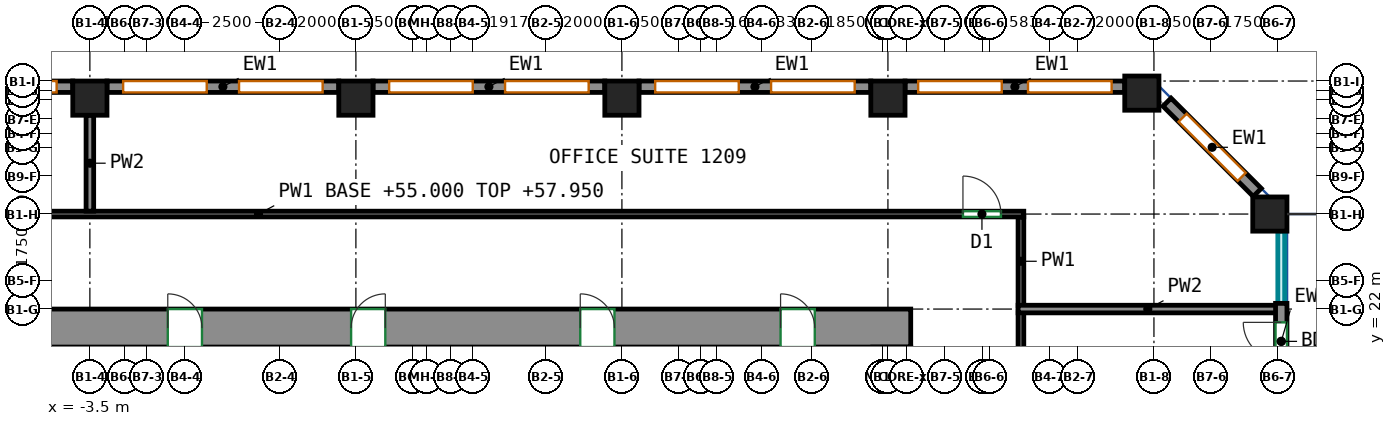
"""IFC4 building model, lengths in metres.
Left out: names, types, materials, properties, quantities, classifications, styles, units other than length and angle.
Written with IfcOpenShell. Run it as: python <this file> out.ifc"""

import sys

from ifc_helpers import new_model, si_unit, direction, frame, frame_2d, origin, origin_2d, place, context, subcontext, project, spatial, rectangle, extrude, source, transform, mapped, element, fill, save


model = new_model("IFC4")
c1 = context("Model", 3, precision=1e-05, world=origin(), true_north=direction((0.0, 1.0)))
c2 = subcontext(c1, "Body", "Model", "MODEL_VIEW")
j1 = project(units=[si_unit("LENGTHUNIT", "METRE"), si_unit("PLANEANGLEUNIT", "RADIAN")], contexts=[c1])
p1 = place(None, origin())
s1 = spatial("IfcSite", under=j1, at=p1, CompositionType="ELEMENT")
p2 = place(p1, origin())
s2 = spatial("IfcBuilding", under=s1, at=p2, CompositionType="ELEMENT")
p3 = place(p2, frame((0.0, 0.0, 55.0)))
s3 = spatial("IfcBuildingStorey", under=s2, at=p3, CompositionType="ELEMENT", Elevation=55.0)
m1 = source(origin(), c2, "Body", "SweptSolid", [
    extrude(rectangle(XDim=0.9, YDim=0.9, at=origin_2d()), origin(), (0.0, 0.0, 1.0), 3.6),
])
for number, where, z_axis, x_axis in (
    (1, (-3.5, 27.55, 0.0), (0.0, 0.0, 1.0), (1.0, 0.0, 0.0)),
    (2, (3.5, 27.55, 0.0), (0.0, 0.0, 1.0), (1.0, 0.0, 0.0)),
    (3, (10.5, 27.55, 0.0), (0.0, 0.0, 1.0), (1.0, 0.0, 0.0)),
    (4, (17.5, 27.55, 0.0), (0.0, 0.0, 1.0), (1.0, 0.0, 0.0)),
    (5, (24.182, 27.682, 0.0), (0.0, 0.0, 1.0), (1.0, 0.0, 0.0)),
    (6, (27.55, 24.5, 0.0), (0.0, 0.0, 1.0), (1.0, 0.0, 0.0)),
):
    element("IfcColumn", number, at=place(p3, frame(where, z_axis=z_axis, x_axis=x_axis)), inside=s3, PredefinedType="COLUMN", context=c2, shape_type="MappedRepresentation", body=[
        mapped(m1, transform((0.0, 0.0, 0.0))),
    ])
m2 = source(origin(), c2, "Body", "SweptSolid", [
    extrude(rectangle(XDim=34.1, YDim=1.0, at=frame_2d((17.05, 0.0))), origin(), (0.0, 0.0, 1.0), 3.6),
])
p4 = place(p3, frame((-16.0, 21.5, 0.0), z_axis=(0.0, 0.0, 1.0), x_axis=(1.0, 0.0, 0.0)))
e7 = element("IfcWall", 7, at=p4, inside=s3, PredefinedType="SHEAR", context=c2, shape_type="MappedRepresentation", body=[
    mapped(m2, transform((0.0, 0.0, 0.0))),
])
p5 = place(p4, frame((8.52, 0.0, 0.0)))
e8 = element("IfcOpeningElement", 8, at=p5, cuts=e7, PredefinedType="OPENING", context=c2, shape_type="SweptSolid", body=[
    extrude(rectangle(XDim=0.9, YDim=2.1, at=frame_2d((0.45, 1.05))), frame((0.0, 0.51, 0.0), z_axis=(0.0, -1.0, 0.0), x_axis=(1.0, 0.0, 0.0)), (0.0, 0.0, 1.0), 1.02),
])
p6 = place(p4, frame((14.55, 0.0, 0.0)))
e9 = element("IfcOpeningElement", 9, at=p6, cuts=e7, PredefinedType="OPENING", context=c2, shape_type="SweptSolid", body=[
    extrude(rectangle(XDim=0.9, YDim=2.1, at=frame_2d((0.45, 1.05))), frame((0.0, 0.51, 0.0), z_axis=(0.0, -1.0, 0.0), x_axis=(1.0, 0.0, 0.0)), (0.0, 0.0, 1.0), 1.02),
])
p7 = place(p4, frame((19.374, 0.0, 0.0)))
e10 = element("IfcOpeningElement", 10, at=p7, cuts=e7, PredefinedType="OPENING", context=c2, shape_type="SweptSolid", body=[
    extrude(rectangle(XDim=0.9, YDim=2.1, at=frame_2d((0.45, 1.05))), frame((0.0, 0.51, 0.0), z_axis=(0.0, -1.0, 0.0), x_axis=(1.0, 0.0, 0.0)), (0.0, 0.0, 1.0), 1.02),
])
p8 = place(p4, frame((25.404, 0.0, 0.0)))
e11 = element("IfcOpeningElement", 11, at=p8, cuts=e7, PredefinedType="OPENING", context=c2, shape_type="SweptSolid", body=[
    extrude(rectangle(XDim=0.9, YDim=2.1, at=frame_2d((0.45, 1.05))), frame((0.0, 0.51, 0.0), z_axis=(0.0, -1.0, 0.0), x_axis=(1.0, 0.0, 0.0)), (0.0, 0.0, 1.0), 1.02),
])
p9 = place(p4, frame((2.525, 0.0, 0.0)))
e12 = element("IfcOpeningElement", 12, at=p9, cuts=e7, PredefinedType="OPENING", context=c2, shape_type="SweptSolid", body=[
    extrude(rectangle(XDim=0.9, YDim=2.1, at=frame_2d((0.45, 1.05))), frame((0.0, 0.51, 0.0), z_axis=(0.0, -1.0, 0.0), x_axis=(1.0, 0.0, 0.0)), (0.0, 0.0, 1.0), 1.02),
])
p10 = place(p4, frame((30.675, 0.0, 0.0)))
e13 = element("IfcOpeningElement", 13, at=p10, cuts=e7, PredefinedType="OPENING", context=c2, shape_type="SweptSolid", body=[
    extrude(rectangle(XDim=0.9, YDim=2.1, at=frame_2d((0.45, 1.05))), frame((0.0, 0.51, 0.0), z_axis=(0.0, -1.0, 0.0), x_axis=(1.0, 0.0, 0.0)), (0.0, 0.0, 1.0), 1.02),
])
m3 = source(origin(), c2, "Body", "SweptSolid", [
    extrude(rectangle(XDim=2.0, YDim=0.3, at=frame_2d((1.0, 0.0))), origin(), (0.0, 0.0, 1.0), 3.6),
])
p11 = place(p3, frame((27.85, 20.15, 0.0), z_axis=(0.0, 0.0, 1.0), x_axis=(0.0, 1.0, 0.0)))
e14 = element("IfcWall", 14, at=p11, inside=s3, PredefinedType="SOLIDWALL", context=c2, shape_type="MappedRepresentation", body=[
    mapped(m3, transform((0.0, 0.0, 0.0))),
])
p12 = place(p11, frame((0.5, 0.0, 0.0)))
e15 = element("IfcOpeningElement", 15, at=p12, cuts=e14, PredefinedType="OPENING", context=c2, shape_type="SweptSolid", body=[
    extrude(rectangle(XDim=1.0, YDim=2.1, at=frame_2d((0.5, 1.05))), frame((0.0, 0.16, 0.0), z_axis=(0.0, -1.0, 0.0), x_axis=(1.0, 0.0, 0.0)), (0.0, 0.0, 1.0), 0.32),
])
m4 = source(origin(), c2, "Body", "SweptSolid", [
    extrude(rectangle(XDim=3.359, YDim=0.3, at=frame_2d((1.679, 0.0))), origin(), (0.0, 0.0, 1.0), 3.6),
])
p13 = place(p3, frame((27.219, 25.069, 0.0), z_axis=(0.0, 0.0, 1.0), x_axis=(-0.707070438228, 0.707143122278, 0.0)))
e16 = element("IfcWall", 16, at=p13, inside=s3, PredefinedType="SOLIDWALL", context=c2, shape_type="MappedRepresentation", body=[
    mapped(m4, transform((0.0, 0.0, 0.0))),
])
p14 = place(p13, frame((0.579, 0.0, 0.7)))
e17 = element("IfcOpeningElement", 17, at=p14, cuts=e16, PredefinedType="OPENING", context=c2, shape_type="SweptSolid", body=[
    extrude(rectangle(XDim=2.2, YDim=2.25, at=frame_2d((1.1, 1.125))), frame((0.0, 0.16, 0.0), z_axis=(0.0, -1.0, 0.0), x_axis=(1.0, 0.0, 0.0)), (0.0, 0.0, 1.0), 0.32),
])
m5 = source(origin(), c2, "Body", "SweptSolid", [
    extrude(rectangle(XDim=5.782, YDim=0.3, at=frame_2d((2.891, 0.0))), origin(), (0.0, 0.0, 1.0), 3.6),
])
p15 = place(p3, frame((23.732, 27.85, 0.0), z_axis=(0.0, 0.0, 1.0), x_axis=(-1.0, 0.0, 0.0)))
e18 = element("IfcWall", 18, at=p15, inside=s3, PredefinedType="SOLIDWALL", context=c2, shape_type="MappedRepresentation", body=[
    mapped(m5, transform((0.0, 0.0, 0.0))),
])
p16 = place(p15, frame((0.345, 0.0, 0.7)))
e19 = element("IfcOpeningElement", 19, at=p16, cuts=e18, PredefinedType="OPENING", context=c2, shape_type="SweptSolid", body=[
    extrude(rectangle(XDim=2.2, YDim=2.25, at=frame_2d((1.1, 1.125))), frame((0.0, 0.16, 0.0), z_axis=(0.0, -1.0, 0.0), x_axis=(1.0, 0.0, 0.0)), (0.0, 0.0, 1.0), 0.32),
])
p17 = place(p15, frame((3.236, 0.0, 0.7)))
e20 = element("IfcOpeningElement", 20, at=p17, cuts=e18, PredefinedType="OPENING", context=c2, shape_type="SweptSolid", body=[
    extrude(rectangle(XDim=2.2, YDim=2.25, at=frame_2d((1.1, 1.125))), frame((0.0, 0.16, 0.0), z_axis=(0.0, -1.0, 0.0), x_axis=(1.0, 0.0, 0.0)), (0.0, 0.0, 1.0), 0.32),
])
m6 = source(origin(), c2, "Body", "SweptSolid", [
    extrude(rectangle(XDim=6.1, YDim=0.3, at=frame_2d((3.05, 0.0))), origin(), (0.0, 0.0, 1.0), 3.6),
])
p18 = place(p3, frame((17.05, 27.85, 0.0), z_axis=(0.0, 0.0, 1.0), x_axis=(-1.0, 0.0, 0.0)))
e21 = element("IfcWall", 21, at=p18, inside=s3, PredefinedType="SOLIDWALL", context=c2, shape_type="MappedRepresentation", body=[
    mapped(m6, transform((0.0, 0.0, 0.0))),
])
p19 = place(p18, frame((0.425, 0.0, 0.7)))
e22 = element("IfcOpeningElement", 22, at=p19, cuts=e21, PredefinedType="OPENING", context=c2, shape_type="SweptSolid", body=[
    extrude(rectangle(XDim=2.2, YDim=2.25, at=frame_2d((1.1, 1.125))), frame((0.0, 0.16, 0.0), z_axis=(0.0, -1.0, 0.0), x_axis=(1.0, 0.0, 0.0)), (0.0, 0.0, 1.0), 0.32),
])
p20 = place(p18, frame((3.475, 0.0, 0.7)))
e23 = element("IfcOpeningElement", 23, at=p20, cuts=e21, PredefinedType="OPENING", context=c2, shape_type="SweptSolid", body=[
    extrude(rectangle(XDim=2.2, YDim=2.25, at=frame_2d((1.1, 1.125))), frame((0.0, 0.16, 0.0), z_axis=(0.0, -1.0, 0.0), x_axis=(1.0, 0.0, 0.0)), (0.0, 0.0, 1.0), 0.32),
])
p21 = place(p3, frame((10.05, 27.85, 0.0), z_axis=(0.0, 0.0, 1.0), x_axis=(-1.0, 0.0, 0.0)))
e24 = element("IfcWall", 24, at=p21, inside=s3, PredefinedType="SOLIDWALL", context=c2, shape_type="MappedRepresentation", body=[
    mapped(m6, transform((0.0, 0.0, 0.0))),
])
p22 = place(p21, frame((0.425, 0.0, 0.7)))
e25 = element("IfcOpeningElement", 25, at=p22, cuts=e24, PredefinedType="OPENING", context=c2, shape_type="SweptSolid", body=[
    extrude(rectangle(XDim=2.2, YDim=2.25, at=frame_2d((1.1, 1.125))), frame((0.0, 0.16, 0.0), z_axis=(0.0, -1.0, 0.0), x_axis=(1.0, 0.0, 0.0)), (0.0, 0.0, 1.0), 0.32),
])
p23 = place(p21, frame((3.475, 0.0, 0.7)))
e26 = element("IfcOpeningElement", 26, at=p23, cuts=e24, PredefinedType="OPENING", context=c2, shape_type="SweptSolid", body=[
    extrude(rectangle(XDim=2.2, YDim=2.25, at=frame_2d((1.1, 1.125))), frame((0.0, 0.16, 0.0), z_axis=(0.0, -1.0, 0.0), x_axis=(1.0, 0.0, 0.0)), (0.0, 0.0, 1.0), 0.32),
])
p24 = place(p3, frame((3.05, 27.85, 0.0), z_axis=(0.0, 0.0, 1.0), x_axis=(-1.0, 0.0, 0.0)))
e27 = element("IfcWall", 27, at=p24, inside=s3, PredefinedType="SOLIDWALL", context=c2, shape_type="MappedRepresentation", body=[
    mapped(m6, transform((0.0, 0.0, 0.0))),
])
p25 = place(p24, frame((0.425, 0.0, 0.7)))
e28 = element("IfcOpeningElement", 28, at=p25, cuts=e27, PredefinedType="OPENING", context=c2, shape_type="SweptSolid", body=[
    extrude(rectangle(XDim=2.2, YDim=2.25, at=frame_2d((1.1, 1.125))), frame((0.0, 0.16, 0.0), z_axis=(0.0, -1.0, 0.0), x_axis=(1.0, 0.0, 0.0)), (0.0, 0.0, 1.0), 0.32),
])
p26 = place(p24, frame((3.475, 0.0, 0.7)))
e29 = element("IfcOpeningElement", 29, at=p26, cuts=e27, PredefinedType="OPENING", context=c2, shape_type="SweptSolid", body=[
    extrude(rectangle(XDim=2.2, YDim=2.25, at=frame_2d((1.1, 1.125))), frame((0.0, 0.16, 0.0), z_axis=(0.0, -1.0, 0.0), x_axis=(1.0, 0.0, 0.0)), (0.0, 0.0, 1.0), 0.32),
])
p27 = place(p3, frame((-3.95, 27.85, 0.0), z_axis=(0.0, 0.0, 1.0), x_axis=(-1.0, 0.0, 0.0)))
e30 = element("IfcWall", 30, at=p27, inside=s3, PredefinedType="SOLIDWALL", context=c2, shape_type="MappedRepresentation", body=[
    mapped(m6, transform((0.0, 0.0, 0.0))),
])
p28 = place(p27, frame((0.425, 0.0, 0.7)))
e31 = element("IfcOpeningElement", 31, at=p28, cuts=e30, PredefinedType="OPENING", context=c2, shape_type="SweptSolid", body=[
    extrude(rectangle(XDim=2.2, YDim=2.25, at=frame_2d((1.1, 1.125))), frame((0.0, 0.16, 0.0), z_axis=(0.0, -1.0, 0.0), x_axis=(1.0, 0.0, 0.0)), (0.0, 0.0, 1.0), 0.32),
])
p29 = place(p27, frame((3.475, 0.0, 0.7)))
e32 = element("IfcOpeningElement", 32, at=p29, cuts=e30, PredefinedType="OPENING", context=c2, shape_type="SweptSolid", body=[
    extrude(rectangle(XDim=2.2, YDim=2.25, at=frame_2d((1.1, 1.125))), frame((0.0, 0.16, 0.0), z_axis=(0.0, -1.0, 0.0), x_axis=(1.0, 0.0, 0.0)), (0.0, 0.0, 1.0), 0.32),
])
p30 = place(p3, frame((21.0, 17.75, 0.0), z_axis=(0.0, 0.0, 1.0), x_axis=(0.0, 1.0, 0.0)))
e33 = element("IfcWall", 33, at=p30, inside=s3, PredefinedType="PARTITIONING", context=c2, shape_type="SweptSolid", body=[
    extrude(rectangle(XDim=4.16, YDim=0.15, at=frame_2d((2.08, 0.0))), origin(), (0.0, 0.0, 1.0), 3.6),
])
p31 = place(p3, frame((21.0, 22.09, 0.0), z_axis=(0.0, 0.0, 1.0), x_axis=(0.0, 1.0, 0.0)))
e34 = element("IfcWall", 34, at=p31, inside=s3, PredefinedType="PARTITIONING", context=c2, shape_type="SweptSolid", body=[
    extrude(rectangle(XDim=2.335, YDim=0.15, at=frame_2d((1.167, 0.0))), origin(), (0.0, 0.0, 1.0), 3.6),
])
p32 = place(p3, frame((-19.2, 24.5, 0.0), z_axis=(0.0, 0.0, 1.0), x_axis=(1.0, 0.0, 0.0)))
e35 = element("IfcWall", 35, at=p32, inside=s3, PredefinedType="PARTITIONING", context=c2, shape_type="SweptSolid", body=[
    extrude(rectangle(XDim=40.275, YDim=0.15, at=frame_2d((20.137, 0.0))), origin(), (0.0, 0.0, 1.0), 2.95),
])
p33 = place(p32, frame((3.007, 0.0, 0.0)))
e36 = element("IfcOpeningElement", 36, at=p33, cuts=e35, PredefinedType="OPENING", context=c2, shape_type="SweptSolid", body=[
    extrude(rectangle(XDim=0.9, YDim=2.1, at=frame_2d((0.45, 1.05))), frame((0.0, 0.085, 0.0), z_axis=(0.0, -1.0, 0.0), x_axis=(1.0, 0.0, 0.0)), (0.0, 0.0, 1.0), 0.17),
])
p34 = place(p32, frame((5.59, 0.0, 0.0)))
e37 = element("IfcOpeningElement", 37, at=p34, cuts=e35, PredefinedType="OPENING", context=c2, shape_type="SweptSolid", body=[
    extrude(rectangle(XDim=0.9, YDim=2.1, at=frame_2d((0.45, 1.05))), frame((0.0, 0.085, 0.0), z_axis=(0.0, -1.0, 0.0), x_axis=(1.0, 0.0, 0.0)), (0.0, 0.0, 1.0), 0.17),
])
p35 = place(p32, frame((38.674, 0.0, 0.0)))
e38 = element("IfcOpeningElement", 38, at=p35, cuts=e35, PredefinedType="OPENING", context=c2, shape_type="SweptSolid", body=[
    extrude(rectangle(XDim=1.0, YDim=2.1, at=frame_2d((0.5, 1.05))), frame((0.0, 0.085, 0.0), z_axis=(0.0, -1.0, 0.0), x_axis=(1.0, 0.0, 0.0)), (0.0, 0.0, 1.0), 0.17),
])
p36 = place(p3, frame((27.75, 22.0, 0.0), z_axis=(0.0, 0.0, 1.0), x_axis=(-1.0, 0.0, 0.0)))
e39 = element("IfcWall", 39, at=p36, inside=s3, PredefinedType="PARTITIONING", context=c2, shape_type="SweptSolid", body=[
    extrude(rectangle(XDim=6.824, YDim=0.2, at=frame_2d((3.412, 0.0))), origin(), (0.0, 0.0, 1.0), 3.6),
])
p37 = place(p3, frame((-3.5, 24.576, 0.0), z_axis=(0.0, 0.0, 1.0), x_axis=(0.0, 1.0, 0.0)))
e40 = element("IfcWall", 40, at=p37, inside=s3, PredefinedType="PARTITIONING", context=c2, shape_type="SweptSolid", body=[
    extrude(rectangle(XDim=2.524, YDim=0.2, at=frame_2d((1.262, 0.0))), origin(), (0.0, 0.0, 1.0), 3.6),
])
p38 = place(p12, origin())
e41 = element("IfcDoor", 41, at=p38, inside=s3, OperationType="SINGLE_SWING_RIGHT", PredefinedType="DOOR", context=c2, shape_type="SweptSolid", body=[
    extrude(rectangle(XDim=1.0, YDim=2.1, at=frame_2d((0.5, 1.05))), frame((0.0, 0.025, 0.0), z_axis=(0.0, -1.0, 0.0), x_axis=(1.0, 0.0, 0.0)), (0.0, 0.0, 1.0), 0.05),
])
fill(e15, e41)
p39 = place(p14, origin())
e42 = element("IfcWindow", 42, at=p39, inside=s3, PartitioningType="SINGLE_PANEL", PredefinedType="WINDOW", context=c2, shape_type="SweptSolid", body=[
    extrude(rectangle(XDim=2.2, YDim=2.25, at=frame_2d((1.1, 1.125))), frame((0.0, 0.03, 0.0), z_axis=(0.0, -1.0, 0.0), x_axis=(1.0, 0.0, 0.0)), (0.0, 0.0, 1.0), 0.06),
])
fill(e17, e42)
p40 = place(p16, origin())
e43 = element("IfcWindow", 43, at=p40, inside=s3, PartitioningType="SINGLE_PANEL", PredefinedType="WINDOW", context=c2, shape_type="SweptSolid", body=[
    extrude(rectangle(XDim=2.2, YDim=2.25, at=frame_2d((1.1, 1.125))), frame((0.0, 0.03, 0.0), z_axis=(0.0, -1.0, 0.0), x_axis=(1.0, 0.0, 0.0)), (0.0, 0.0, 1.0), 0.06),
])
fill(e19, e43)
p41 = place(p17, origin())
e44 = element("IfcWindow", 44, at=p41, inside=s3, PartitioningType="SINGLE_PANEL", PredefinedType="WINDOW", context=c2, shape_type="SweptSolid", body=[
    extrude(rectangle(XDim=2.2, YDim=2.25, at=frame_2d((1.1, 1.125))), frame((0.0, 0.03, 0.0), z_axis=(0.0, -1.0, 0.0), x_axis=(1.0, 0.0, 0.0)), (0.0, 0.0, 1.0), 0.06),
])
fill(e20, e44)
p42 = place(p19, origin())
e45 = element("IfcWindow", 45, at=p42, inside=s3, PartitioningType="SINGLE_PANEL", PredefinedType="WINDOW", context=c2, shape_type="SweptSolid", body=[
    extrude(rectangle(XDim=2.2, YDim=2.25, at=frame_2d((1.1, 1.125))), frame((0.0, 0.03, 0.0), z_axis=(0.0, -1.0, 0.0), x_axis=(1.0, 0.0, 0.0)), (0.0, 0.0, 1.0), 0.06),
])
fill(e22, e45)
p43 = place(p20, origin())
e46 = element("IfcWindow", 46, at=p43, inside=s3, PartitioningType="SINGLE_PANEL", PredefinedType="WINDOW", context=c2, shape_type="SweptSolid", body=[
    extrude(rectangle(XDim=2.2, YDim=2.25, at=frame_2d((1.1, 1.125))), frame((0.0, 0.03, 0.0), z_axis=(0.0, -1.0, 0.0), x_axis=(1.0, 0.0, 0.0)), (0.0, 0.0, 1.0), 0.06),
])
fill(e23, e46)
p44 = place(p22, origin())
e47 = element("IfcWindow", 47, at=p44, inside=s3, PartitioningType="SINGLE_PANEL", PredefinedType="WINDOW", context=c2, shape_type="SweptSolid", body=[
    extrude(rectangle(XDim=2.2, YDim=2.25, at=frame_2d((1.1, 1.125))), frame((0.0, 0.03, 0.0), z_axis=(0.0, -1.0, 0.0), x_axis=(1.0, 0.0, 0.0)), (0.0, 0.0, 1.0), 0.06),
])
fill(e25, e47)
p45 = place(p23, origin())
e48 = element("IfcWindow", 48, at=p45, inside=s3, PartitioningType="SINGLE_PANEL", PredefinedType="WINDOW", context=c2, shape_type="SweptSolid", body=[
    extrude(rectangle(XDim=2.2, YDim=2.25, at=frame_2d((1.1, 1.125))), frame((0.0, 0.03, 0.0), z_axis=(0.0, -1.0, 0.0), x_axis=(1.0, 0.0, 0.0)), (0.0, 0.0, 1.0), 0.06),
])
fill(e26, e48)
p46 = place(p25, origin())
e49 = element("IfcWindow", 49, at=p46, inside=s3, PartitioningType="SINGLE_PANEL", PredefinedType="WINDOW", context=c2, shape_type="SweptSolid", body=[
    extrude(rectangle(XDim=2.2, YDim=2.25, at=frame_2d((1.1, 1.125))), frame((0.0, 0.03, 0.0), z_axis=(0.0, -1.0, 0.0), x_axis=(1.0, 0.0, 0.0)), (0.0, 0.0, 1.0), 0.06),
])
fill(e28, e49)
p47 = place(p26, origin())
e50 = element("IfcWindow", 50, at=p47, inside=s3, PartitioningType="SINGLE_PANEL", PredefinedType="WINDOW", context=c2, shape_type="SweptSolid", body=[
    extrude(rectangle(XDim=2.2, YDim=2.25, at=frame_2d((1.1, 1.125))), frame((0.0, 0.03, 0.0), z_axis=(0.0, -1.0, 0.0), x_axis=(1.0, 0.0, 0.0)), (0.0, 0.0, 1.0), 0.06),
])
fill(e29, e50)
p48 = place(p28, origin())
e51 = element("IfcWindow", 51, at=p48, inside=s3, PartitioningType="SINGLE_PANEL", PredefinedType="WINDOW", context=c2, shape_type="SweptSolid", body=[
    extrude(rectangle(XDim=2.2, YDim=2.25, at=frame_2d((1.1, 1.125))), frame((0.0, 0.03, 0.0), z_axis=(0.0, -1.0, 0.0), x_axis=(1.0, 0.0, 0.0)), (0.0, 0.0, 1.0), 0.06),
])
fill(e31, e51)
p49 = place(p6, origin())
e52 = element("IfcDoor", 52, at=p49, inside=s3, OperationType="SINGLE_SWING_LEFT", PredefinedType="DOOR", context=c2, shape_type="SweptSolid", body=[
    extrude(rectangle(XDim=0.9, YDim=2.1, at=frame_2d((0.45, 1.05))), frame((0.0, -0.355, 0.0), z_axis=(0.0, -1.0, 0.0), x_axis=(1.0, 0.0, 0.0)), (0.0, 0.0, 1.0), 0.05),
])
fill(e9, e52)
p50 = place(p7, origin())
e53 = element("IfcDoor", 53, at=p50, inside=s3, OperationType="SINGLE_SWING_RIGHT", PredefinedType="DOOR", context=c2, shape_type="SweptSolid", body=[
    extrude(rectangle(XDim=0.9, YDim=2.1, at=frame_2d((0.45, 1.05))), frame((0.0, -0.355, 0.0), z_axis=(0.0, -1.0, 0.0), x_axis=(1.0, 0.0, 0.0)), (0.0, 0.0, 1.0), 0.05),
])
fill(e10, e53)
p51 = place(p8, origin())
e54 = element("IfcDoor", 54, at=p51, inside=s3, OperationType="SINGLE_SWING_LEFT", PredefinedType="DOOR", context=c2, shape_type="SweptSolid", body=[
    extrude(rectangle(XDim=0.9, YDim=2.1, at=frame_2d((0.45, 1.05))), frame((0.0, -0.355, 0.0), z_axis=(0.0, -1.0, 0.0), x_axis=(1.0, 0.0, 0.0)), (0.0, 0.0, 1.0), 0.05),
])
fill(e11, e54)
p52 = place(p10, origin())
e55 = element("IfcDoor", 55, at=p52, inside=s3, OperationType="SINGLE_SWING_LEFT", PredefinedType="DOOR", context=c2, shape_type="SweptSolid", body=[
    extrude(rectangle(XDim=0.9, YDim=2.1, at=frame_2d((0.45, 1.05))), frame((0.0, -0.355, 0.0), z_axis=(0.0, -1.0, 0.0), x_axis=(1.0, 0.0, 0.0)), (0.0, 0.0, 1.0), 0.05),
])
fill(e13, e55)
p53 = place(p35, origin())
e56 = element("IfcDoor", 56, at=p53, inside=s3, OperationType="SINGLE_SWING_LEFT", PredefinedType="DOOR", context=c2, shape_type="SweptSolid", body=[
    extrude(rectangle(XDim=1.0, YDim=2.1, at=frame_2d((0.5, 1.05))), frame((0.0, 0.025, 0.0), z_axis=(0.0, -1.0, 0.0), x_axis=(1.0, 0.0, 0.0)), (0.0, 0.0, 1.0), 0.05),
])
fill(e38, e56)
save(model, sys.argv[1])
